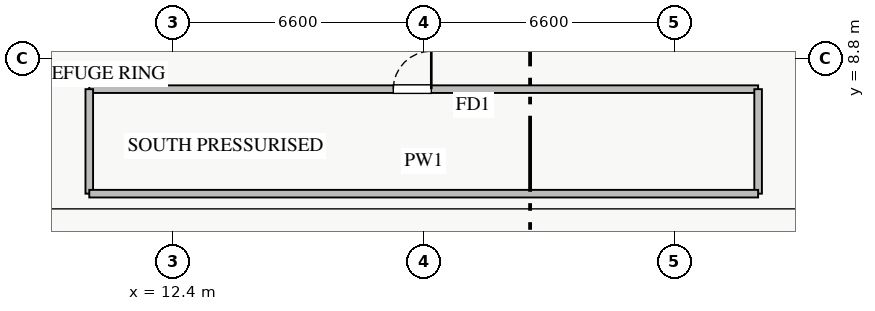
"""IFC4 building model, lengths in metres.
Left out: names, types, materials, properties, quantities, classifications, styles, units other than length and angle.
Written with IfcOpenShell. Run it as: python <this file> out.ifc"""

import sys

from ifc_helpers import new_model, si_unit, direction, frame, frame_2d, origin, place, context, subcontext, project, spatial, rectangle, extrude, source, transform, mapped, element, fill, save


model = new_model("IFC4")
c1 = context("Model", 3, precision=1e-05, world=origin(), true_north=direction((0.0, 1.0)))
c2 = subcontext(c1, "Body", "Model", "MODEL_VIEW")
j1 = project(units=[si_unit("LENGTHUNIT", "METRE"), si_unit("PLANEANGLEUNIT", "RADIAN")], contexts=[c1])
p1 = place(None, origin())
s1 = spatial("IfcSite", under=j1, at=p1, CompositionType="ELEMENT")
p2 = place(p1, origin())
s2 = spatial("IfcBuilding", under=s1, at=p2, CompositionType="ELEMENT")
p3 = place(p2, frame((0.0, 0.0, 92.5)))
s3 = spatial("IfcBuildingStorey", under=s2, at=p3, CompositionType="ELEMENT", Elevation=92.5)
p4 = place(p3, frame((10.2, 8.0, 0.0), z_axis=(0.0, 0.0, 1.0), x_axis=(1.0, 0.0, 0.0)))
e1 = element("IfcWall", 1, at=p4, inside=s3, PredefinedType="PARTITIONING", context=c2, shape_type="SweptSolid", body=[
    extrude(rectangle(XDim=17.6, YDim=0.2, at=frame_2d((8.8, 0.0))), origin(), (0.0, 0.0, 1.0), 4.32),
])
p5 = place(p4, frame((8.0, 0.0, 0.0)))
e2 = element("IfcOpeningElement", 2, at=p5, cuts=e1, PredefinedType="OPENING", context=c2, shape_type="SweptSolid", body=[
    extrude(rectangle(XDim=1.0, YDim=2.05, at=frame_2d((0.5, 1.025))), frame((0.0, 0.11, 0.0), z_axis=(0.0, -1.0, 0.0), x_axis=(1.0, 0.0, 0.0)), (0.0, 0.0, 1.0), 0.22),
])
for number, where, z_axis, x_axis in (
    (3, (10.2, 5.25, 0.0), (0.0, 0.0, 1.0), (0.0, 1.0, 0.0)),
    (4, (27.8, 5.25, 0.0), (0.0, 0.0, 1.0), (0.0, 1.0, 0.0)),
):
    element("IfcWall", number, at=place(p3, frame(where, z_axis=z_axis, x_axis=x_axis)), inside=s3, PredefinedType="PARTITIONING", context=c2, shape_type="SweptSolid", body=[
        extrude(rectangle(XDim=2.75, YDim=0.2, at=frame_2d((1.375, 0.0))), origin(), (0.0, 0.0, 1.0), 4.32),
    ])
p6 = place(p3, frame((10.2, 5.25, 0.0), z_axis=(0.0, 0.0, 1.0), x_axis=(1.0, 0.0, 0.0)))
e5 = element("IfcWall", 5, at=p6, inside=s3, PredefinedType="PARTITIONING", context=c2, shape_type="SweptSolid", body=[
    extrude(rectangle(XDim=17.6, YDim=0.2, at=frame_2d((8.8, 0.0))), origin(), (0.0, 0.0, 1.0), 1.915),
])
m1 = source(origin(), c2, "Body", "SweptSolid", [
    extrude(rectangle(XDim=1.0, YDim=2.05, at=frame_2d((0.5, 1.025))), frame((0.0, 0.025, 0.0), z_axis=(0.0, -1.0, 0.0), x_axis=(1.0, 0.0, 0.0)), (0.0, 0.0, 1.0), 0.05),
])
p7 = place(p5, origin())
e6 = element("IfcDoor", 6, at=p7, inside=s3, OperationType="SINGLE_SWING_RIGHT", PredefinedType="DOOR", context=c2, shape_type="MappedRepresentation", body=[
    mapped(m1, transform((0.0, 0.0, 0.0), x_axis=(1.0, 0.0, 0.0), y_axis=(0.0, 1.0, 0.0), z_axis=(0.0, 0.0, 1.0), scale=1.0)),
])
fill(e2, e6)
save(model, sys.argv[1])
